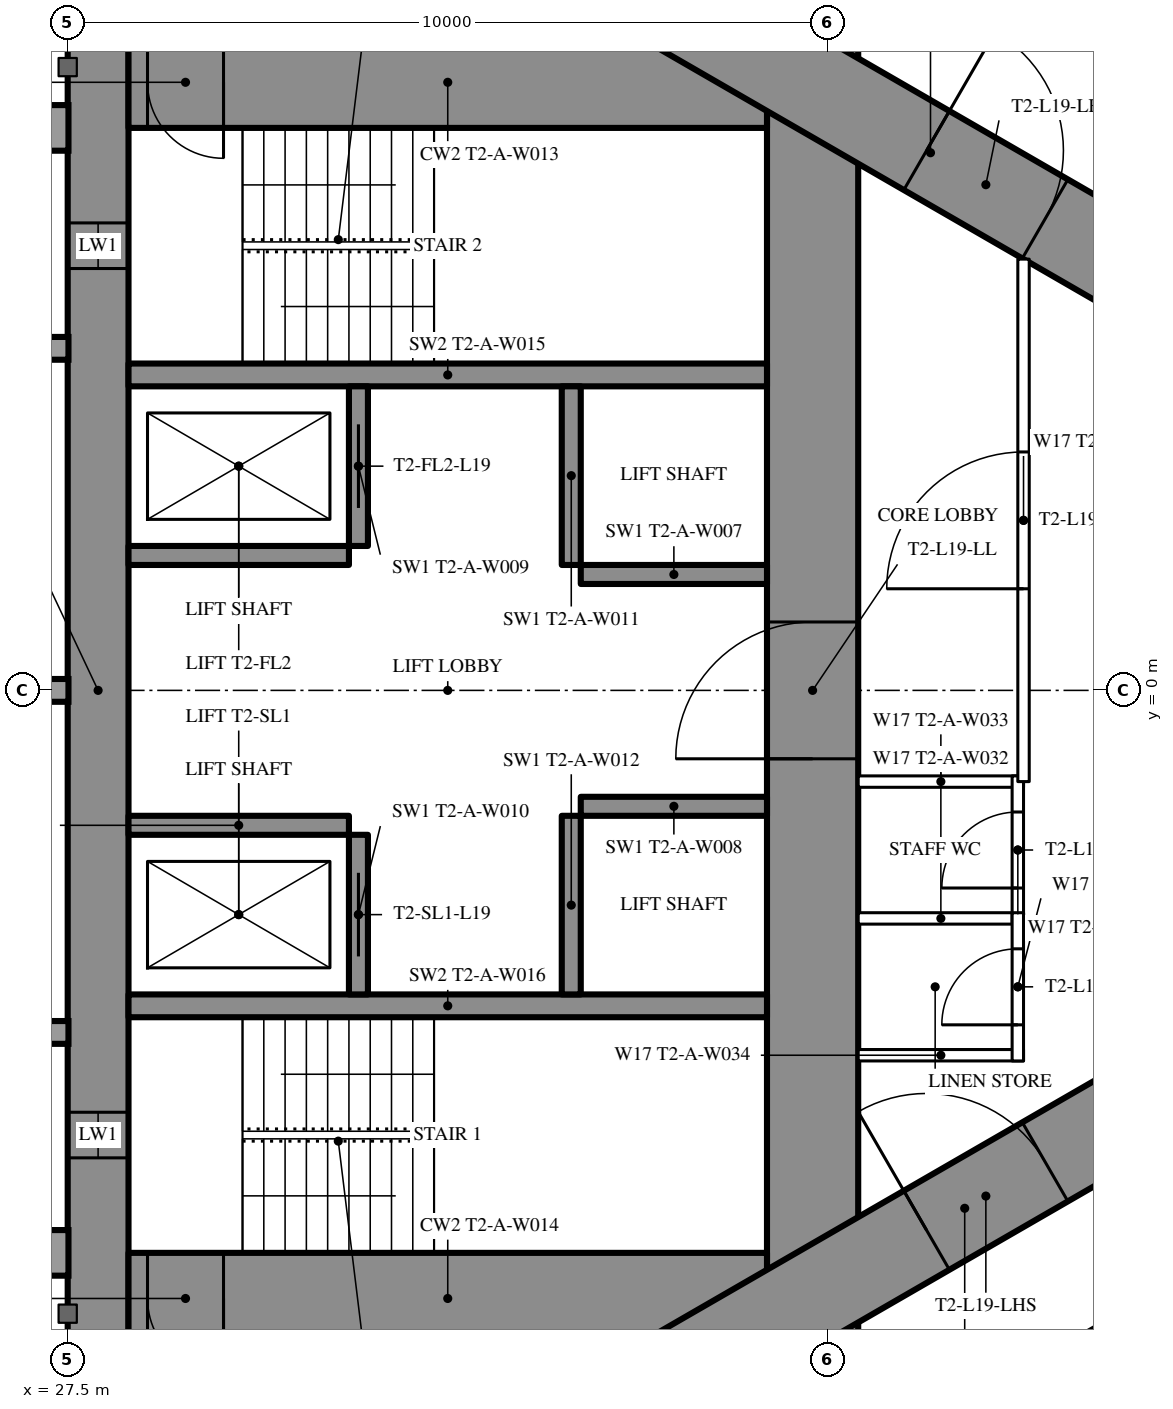
"""IFC4 building model, lengths in metres.
Left out: names, types, materials, properties, quantities, classifications, styles, units other than length and angle.
Written with IfcOpenShell. Run it as: python <this file> out.ifc"""

import sys

from ifc_helpers import new_model, si_unit, direction, frame, frame_2d, origin, place, context, subcontext, project, spatial, rectangle, extrude, element, fill, save


model = new_model("IFC4")
c1 = context("Model", 3, precision=1e-05, world=origin(), true_north=direction((0.0, 1.0)))
c2 = subcontext(c1, "Body", "Model", "MODEL_VIEW")
j1 = project(units=[si_unit("LENGTHUNIT", "METRE"), si_unit("PLANEANGLEUNIT", "RADIAN")], contexts=[c1])
p1 = place(None, origin())
s1 = spatial("IfcSite", under=j1, at=p1, CompositionType="ELEMENT")
p2 = place(p1, origin())
s2 = spatial("IfcBuilding", under=s1, at=p2, CompositionType="ELEMENT")
p3 = place(p2, frame((0.0, 0.0, 74.0)))
s3 = spatial("IfcBuildingStorey", under=s2, at=p3, CompositionType="ELEMENT", Elevation=74.0)
p4 = place(p3, frame((27.9, -8.6, 0.0), z_axis=(0.0, 0.0, 1.0), x_axis=(0.0, 1.0, 0.0)))
e1 = element("IfcWall", 1, at=p4, inside=s3, PredefinedType="SHEAR", context=c2, shape_type="SweptSolid", body=[
    extrude(rectangle(XDim=17.2, YDim=0.8, at=frame_2d((8.6, 0.0))), origin(), (0.0, 0.0, 1.0), 3.5),
])
p5 = place(p4, frame((2.45, 0.0, 0.6)))
e2 = element("IfcOpeningElement", 2, at=p5, cuts=e1, PredefinedType="OPENING", context=c2, shape_type="SweptSolid", body=[
    extrude(rectangle(XDim=0.6, YDim=2.1, at=frame_2d((0.3, 1.05))), frame((0.0, 0.41, 0.0), z_axis=(0.0, -1.0, 0.0), x_axis=(1.0, 0.0, 0.0)), (0.0, 0.0, 1.0), 0.82),
])
p6 = place(p4, frame((14.15, 0.0, 0.6)))
e3 = element("IfcOpeningElement", 3, at=p6, cuts=e1, PredefinedType="OPENING", context=c2, shape_type="SweptSolid", body=[
    extrude(rectangle(XDim=0.6, YDim=2.1, at=frame_2d((0.3, 1.05))), frame((0.0, 0.41, 0.0), z_axis=(0.0, -1.0, 0.0), x_axis=(1.0, 0.0, 0.0)), (0.0, 0.0, 1.0), 0.82),
])
p7 = place(p3, frame((37.3, -8.6, 0.0), z_axis=(0.0, 0.0, 1.0), x_axis=(0.0, 1.0, 0.0)))
e4 = element("IfcWall", 4, at=p7, inside=s3, PredefinedType="SHEAR", context=c2, shape_type="SweptSolid", body=[
    extrude(rectangle(XDim=17.2, YDim=1.2, at=frame_2d((8.6, 0.0))), origin(), (0.0, 0.0, 1.0), 3.5),
])
p8 = place(p7, frame((7.7, 0.0, 0.0)))
e5 = element("IfcOpeningElement", 5, at=p8, cuts=e4, PredefinedType="OPENING", context=c2, shape_type="SweptSolid", body=[
    extrude(rectangle(XDim=1.8, YDim=2.2, at=frame_2d((0.9, 1.1))), frame((0.0, 0.61, 0.0), z_axis=(0.0, -1.0, 0.0), x_axis=(1.0, 0.0, 0.0)), (0.0, 0.0, 1.0), 1.22),
])
p9 = place(p3, frame((28.3, -8.0, 0.0), z_axis=(0.0, 0.0, 1.0), x_axis=(1.0, 0.0, 0.0)))
e6 = element("IfcWall", 6, at=p9, inside=s3, PredefinedType="SHEAR", context=c2, shape_type="SweptSolid", body=[
    extrude(rectangle(XDim=8.4, YDim=1.2, at=frame_2d((4.2, 0.0))), origin(), (0.0, 0.0, 1.0), 3.5),
])
p10 = place(p9, frame((0.25, 0.0, 0.0)))
e7 = element("IfcOpeningElement", 7, at=p10, cuts=e6, PredefinedType="OPENING", context=c2, shape_type="SweptSolid", body=[
    extrude(rectangle(XDim=1.0, YDim=2.2, at=frame_2d((0.5, 1.1))), frame((0.0, 0.61, 0.0), z_axis=(0.0, -1.0, 0.0), x_axis=(1.0, 0.0, 0.0)), (0.0, 0.0, 1.0), 1.22),
])
p11 = place(p3, frame((28.3, 8.0, 0.0), z_axis=(0.0, 0.0, 1.0), x_axis=(1.0, 0.0, 0.0)))
e8 = element("IfcWall", 8, at=p11, inside=s3, PredefinedType="SHEAR", context=c2, shape_type="SweptSolid", body=[
    extrude(rectangle(XDim=8.4, YDim=1.2, at=frame_2d((4.2, 0.0))), origin(), (0.0, 0.0, 1.0), 3.5),
])
p12 = place(p11, frame((0.25, 0.0, 0.0)))
e9 = element("IfcOpeningElement", 9, at=p12, cuts=e8, PredefinedType="OPENING", context=c2, shape_type="SweptSolid", body=[
    extrude(rectangle(XDim=1.0, YDim=2.2, at=frame_2d((0.5, 1.1))), frame((0.0, 0.61, 0.0), z_axis=(0.0, -1.0, 0.0), x_axis=(1.0, 0.0, 0.0)), (0.0, 0.0, 1.0), 1.22),
])
for number, where, z_axis, x_axis in (
    (10, (28.3, -4.15, 0.0), (0.0, 0.0, 1.0), (1.0, 0.0, 0.0)),
    (11, (28.3, 4.15, 0.0), (0.0, 0.0, 1.0), (1.0, 0.0, 0.0)),
):
    element("IfcWall", number, at=place(p3, frame(where, z_axis=z_axis, x_axis=x_axis)), inside=s3, PredefinedType="SHEAR", context=c2, shape_type="SweptSolid", body=[
        extrude(rectangle(XDim=8.4, YDim=0.3, at=frame_2d((4.2, 0.0))), origin(), (0.0, 0.0, 1.0), 3.5),
    ])
p13 = place(p3, frame((31.325, -4.0, 0.0), z_axis=(0.0, 0.0, 1.0), x_axis=(0.0, 1.0, 0.0)))
e12 = element("IfcWall", 12, at=p13, inside=s3, PredefinedType="SHEAR", context=c2, shape_type="SweptSolid", body=[
    extrude(rectangle(XDim=2.1, YDim=0.25, at=frame_2d((1.05, 0.0))), origin(), (0.0, 0.0, 1.0), 3.5),
])
p14 = place(p13, frame((0.5, 0.0, 0.0)))
e13 = element("IfcOpeningElement", 13, at=p14, cuts=e12, PredefinedType="OPENING", context=c2, shape_type="SweptSolid", body=[
    extrude(rectangle(XDim=1.1, YDim=2.2, at=frame_2d((0.55, 1.1))), frame((0.0, 0.135, 0.0), z_axis=(0.0, -1.0, 0.0), x_axis=(1.0, 0.0, 0.0)), (0.0, 0.0, 1.0), 0.27),
])
p15 = place(p3, frame((34.125, -4.0, 0.0), z_axis=(0.0, 0.0, 1.0), x_axis=(0.0, 1.0, 0.0)))
e14 = element("IfcWall", 14, at=p15, inside=s3, PredefinedType="SHEAR", context=c2, shape_type="SweptSolid", body=[
    extrude(rectangle(XDim=2.35, YDim=0.25, at=frame_2d((1.175, 0.0))), origin(), (0.0, 0.0, 1.0), 3.5),
])
p16 = place(p3, frame((28.3, -1.775, 0.0), z_axis=(0.0, 0.0, 1.0), x_axis=(1.0, 0.0, 0.0)))
e15 = element("IfcWall", 15, at=p16, inside=s3, PredefinedType="SHEAR", context=c2, shape_type="SweptSolid", body=[
    extrude(rectangle(XDim=2.9, YDim=0.25, at=frame_2d((1.45, 0.0))), origin(), (0.0, 0.0, 1.0), 3.5),
])
p17 = place(p3, frame((34.25, -1.525, 0.0), z_axis=(0.0, 0.0, 1.0), x_axis=(1.0, 0.0, 0.0)))
e16 = element("IfcWall", 16, at=p17, inside=s3, PredefinedType="SHEAR", context=c2, shape_type="SweptSolid", body=[
    extrude(rectangle(XDim=2.45, YDim=0.25, at=frame_2d((1.225, 0.0))), origin(), (0.0, 0.0, 1.0), 3.5),
])
p18 = place(p3, frame((31.325, 1.9, 0.0), z_axis=(0.0, 0.0, 1.0), x_axis=(0.0, 1.0, 0.0)))
e17 = element("IfcWall", 17, at=p18, inside=s3, PredefinedType="SHEAR", context=c2, shape_type="SweptSolid", body=[
    extrude(rectangle(XDim=2.1, YDim=0.25, at=frame_2d((1.05, 0.0))), origin(), (0.0, 0.0, 1.0), 3.5),
])
p19 = place(p18, frame((0.5, 0.0, 0.0)))
e18 = element("IfcOpeningElement", 18, at=p19, cuts=e17, PredefinedType="OPENING", context=c2, shape_type="SweptSolid", body=[
    extrude(rectangle(XDim=1.1, YDim=2.2, at=frame_2d((0.55, 1.1))), frame((0.0, 0.135, 0.0), z_axis=(0.0, -1.0, 0.0), x_axis=(1.0, 0.0, 0.0)), (0.0, 0.0, 1.0), 0.27),
])
p20 = place(p3, frame((34.125, 1.65, 0.0), z_axis=(0.0, 0.0, 1.0), x_axis=(0.0, 1.0, 0.0)))
e19 = element("IfcWall", 19, at=p20, inside=s3, PredefinedType="SHEAR", context=c2, shape_type="SweptSolid", body=[
    extrude(rectangle(XDim=2.35, YDim=0.25, at=frame_2d((1.175, 0.0))), origin(), (0.0, 0.0, 1.0), 3.5),
])
p21 = place(p3, frame((28.3, 1.775, 0.0), z_axis=(0.0, 0.0, 1.0), x_axis=(1.0, 0.0, 0.0)))
e20 = element("IfcWall", 20, at=p21, inside=s3, PredefinedType="SHEAR", context=c2, shape_type="SweptSolid", body=[
    extrude(rectangle(XDim=2.9, YDim=0.25, at=frame_2d((1.45, 0.0))), origin(), (0.0, 0.0, 1.0), 3.5),
])
p22 = place(p3, frame((34.25, 1.525, 0.0), z_axis=(0.0, 0.0, 1.0), x_axis=(1.0, 0.0, 0.0)))
e21 = element("IfcWall", 21, at=p22, inside=s3, PredefinedType="SHEAR", context=c2, shape_type="SweptSolid", body=[
    extrude(rectangle(XDim=2.45, YDim=0.25, at=frame_2d((1.225, 0.0))), origin(), (0.0, 0.0, 1.0), 3.5),
])
p23 = place(p3, frame((27.2, -13.8, 0.0), z_axis=(0.0, 0.0, 1.0), x_axis=(0.866027159892, 0.499996958321, 0.0)))
e22 = element("IfcWall", 22, at=p23, inside=s3, PredefinedType="SHEAR", context=c2, shape_type="SweptSolid", body=[
    extrude(rectangle(XDim=27.947, YDim=1.2, at=frame_2d((13.973, 0.0))), origin(), (0.0, 0.0, 1.0), 3.5),
])
p24 = place(p23, frame((4.6, 0.0, 0.0)))
e23 = element("IfcOpeningElement", 23, at=p24, cuts=e22, PredefinedType="OPENING", context=c2, shape_type="SweptSolid", body=[
    extrude(rectangle(XDim=1.0, YDim=2.2, at=frame_2d((0.5, 1.1))), frame((0.0, 0.61, 0.0), z_axis=(0.0, -1.0, 0.0), x_axis=(1.0, 0.0, 0.0)), (0.0, 0.0, 1.0), 1.22),
])
p25 = place(p23, frame((13.395, 0.0, 0.0)))
e24 = element("IfcOpeningElement", 24, at=p25, cuts=e22, PredefinedType="OPENING", context=c2, shape_type="SweptSolid", body=[
    extrude(rectangle(XDim=1.8, YDim=2.2, at=frame_2d((0.9, 1.1))), frame((0.0, 0.61, 0.0), z_axis=(0.0, -1.0, 0.0), x_axis=(1.0, 0.0, 0.0)), (0.0, 0.0, 1.0), 1.22),
])
p26 = place(p3, frame((27.2, 13.8, 0.0), z_axis=(0.0, 0.0, 1.0), x_axis=(0.866024515034, -0.500001539357, 0.0)))
e25 = element("IfcWall", 25, at=p26, inside=s3, PredefinedType="SHEAR", context=c2, shape_type="SweptSolid", body=[
    extrude(rectangle(XDim=26.907, YDim=1.2, at=frame_2d((13.454, 0.0))), origin(), (0.0, 0.0, 1.0), 3.5),
])
p27 = place(p26, frame((4.6, 0.0, 0.0)))
e26 = element("IfcOpeningElement", 26, at=p27, cuts=e25, PredefinedType="OPENING", context=c2, shape_type="SweptSolid", body=[
    extrude(rectangle(XDim=1.0, YDim=2.2, at=frame_2d((0.5, 1.1))), frame((0.0, 0.61, 0.0), z_axis=(0.0, -1.0, 0.0), x_axis=(1.0, 0.0, 0.0)), (0.0, 0.0, 1.0), 1.22),
])
p28 = place(p26, frame((13.395, 0.0, 0.0)))
e27 = element("IfcOpeningElement", 27, at=p28, cuts=e25, PredefinedType="OPENING", context=c2, shape_type="SweptSolid", body=[
    extrude(rectangle(XDim=1.8, YDim=2.2, at=frame_2d((0.9, 1.1))), frame((0.0, 0.61, 0.0), z_axis=(0.0, -1.0, 0.0), x_axis=(1.0, 0.0, 0.0)), (0.0, 0.0, 1.0), 1.22),
])
p29 = place(p3, frame((36.834, 10.894, 0.0), z_axis=(0.0, 0.0, 1.0), x_axis=(0.866028157229, -0.499995230863, 0.0)))
e28 = element("IfcWall", 28, at=p29, inside=s3, PredefinedType="PARTITIONING", context=c2, shape_type="SweptSolid", body=[
    extrude(rectangle(XDim=21.667, YDim=0.2, at=frame_2d((10.833, 0.0))), origin(), (0.0, 0.0, 1.0), 3.25),
])
p30 = place(p29, frame((18.885, 0.0, 0.0)))
e29 = element("IfcOpeningElement", 29, at=p30, cuts=e28, PredefinedType="OPENING", context=c2, shape_type="SweptSolid", body=[
    extrude(rectangle(XDim=0.95, YDim=2.2, at=frame_2d((0.475, 1.1))), frame((0.0, 0.11, 0.0), z_axis=(0.0, -1.0, 0.0), x_axis=(1.0, 0.0, 0.0)), (0.0, 0.0, 1.0), 0.22),
])
p31 = place(p29, frame((15.443, 0.0, 0.0)))
e30 = element("IfcOpeningElement", 30, at=p31, cuts=e28, PredefinedType="OPENING", context=c2, shape_type="SweptSolid", body=[
    extrude(rectangle(XDim=1.8, YDim=2.2, at=frame_2d((0.9, 1.1))), frame((0.0, 0.11, 0.0), z_axis=(0.0, -1.0, 0.0), x_axis=(1.0, 0.0, 0.0)), (0.0, 0.0, 1.0), 0.22),
])
p32 = place(p29, frame((12.562, 0.0, 0.0)))
e31 = element("IfcOpeningElement", 31, at=p32, cuts=e28, PredefinedType="OPENING", context=c2, shape_type="SweptSolid", body=[
    extrude(rectangle(XDim=0.95, YDim=2.2, at=frame_2d((0.475, 1.1))), frame((0.0, 0.11, 0.0), z_axis=(0.0, -1.0, 0.0), x_axis=(1.0, 0.0, 0.0)), (0.0, 0.0, 1.0), 0.22),
])
p33 = place(p29, frame((4.292, 0.0, 0.0)))
e32 = element("IfcOpeningElement", 32, at=p33, cuts=e28, PredefinedType="OPENING", context=c2, shape_type="SweptSolid", body=[
    extrude(rectangle(XDim=1.0, YDim=2.2, at=frame_2d((0.5, 1.1))), frame((0.0, 0.11, 0.0), z_axis=(0.0, -1.0, 0.0), x_axis=(1.0, 0.0, 0.0)), (0.0, 0.0, 1.0), 0.22),
])
p34 = place(p3, frame((37.96, -10.243, 0.0), z_axis=(0.0, 0.0, 1.0), x_axis=(0.866030548046, 0.499991089772, 0.0)))
e33 = element("IfcWall", 33, at=p34, inside=s3, PredefinedType="PARTITIONING", context=c2, shape_type="SweptSolid", body=[
    extrude(rectangle(XDim=12.849, YDim=0.2, at=frame_2d((6.425, 0.0))), origin(), (0.0, 0.0, 1.0), 3.25),
])
p35 = place(p34, frame((8.949, 0.0, 0.0)))
e34 = element("IfcOpeningElement", 34, at=p35, cuts=e33, PredefinedType="OPENING", context=c2, shape_type="SweptSolid", body=[
    extrude(rectangle(XDim=0.95, YDim=2.2, at=frame_2d((0.475, 1.1))), frame((0.0, 0.11, 0.0), z_axis=(0.0, -1.0, 0.0), x_axis=(1.0, 0.0, 0.0)), (0.0, 0.0, 1.0), 0.22),
])
p36 = place(p34, frame((0.6, 0.0, 0.0)))
e35 = element("IfcOpeningElement", 35, at=p36, cuts=e33, PredefinedType="OPENING", context=c2, shape_type="SweptSolid", body=[
    extrude(rectangle(XDim=0.95, YDim=2.2, at=frame_2d((0.475, 1.1))), frame((0.0, 0.11, 0.0), z_axis=(0.0, -1.0, 0.0), x_axis=(1.0, 0.0, 0.0)), (0.0, 0.0, 1.0), 0.22),
])
for number, where, z_axis, x_axis in (
    (36, (37.9, -1.2, 0.0), (0.0, 0.0, 1.0), (1.0, 0.0, 0.0)),
    (37, (37.9, -3.0, 0.0), (0.0, 0.0, 1.0), (1.0, 0.0, 0.0)),
    (38, (37.9, -4.8, 0.0), (0.0, 0.0, 1.0), (1.0, 0.0, 0.0)),
):
    element("IfcWall", number, at=place(p3, frame(where, z_axis=z_axis, x_axis=x_axis)), inside=s3, PredefinedType="PARTITIONING", context=c2, shape_type="SweptSolid", body=[
        extrude(rectangle(XDim=2.175, YDim=0.15, at=frame_2d((1.087, 0.0))), origin(), (0.0, 0.0, 1.0), 3.25),
    ])
p37 = place(p3, frame((40.0, -3.075, 0.0), z_axis=(0.0, 0.0, 1.0), x_axis=(0.0, 1.0, 0.0)))
e39 = element("IfcWall", 39, at=p37, inside=s3, PredefinedType="PARTITIONING", context=c2, shape_type="SweptSolid", body=[
    extrude(rectangle(XDim=1.95, YDim=0.15, at=frame_2d((0.975, 0.0))), origin(), (0.0, 0.0, 1.0), 3.25),
])
p38 = place(p37, frame((0.475, 0.0, 0.0)))
e40 = element("IfcOpeningElement", 40, at=p38, cuts=e39, PredefinedType="OPENING", context=c2, shape_type="SweptSolid", body=[
    extrude(rectangle(XDim=1.0, YDim=2.2, at=frame_2d((0.5, 1.1))), frame((0.0, 0.085, 0.0), z_axis=(0.0, -1.0, 0.0), x_axis=(1.0, 0.0, 0.0)), (0.0, 0.0, 1.0), 0.17),
])
p39 = place(p3, frame((40.0, -4.875, 0.0), z_axis=(0.0, 0.0, 1.0), x_axis=(0.0, 1.0, 0.0)))
e41 = element("IfcWall", 41, at=p39, inside=s3, PredefinedType="PARTITIONING", context=c2, shape_type="SweptSolid", body=[
    extrude(rectangle(XDim=1.95, YDim=0.15, at=frame_2d((0.975, 0.0))), origin(), (0.0, 0.0, 1.0), 3.25),
])
p40 = place(p39, frame((0.475, 0.0, 0.0)))
e42 = element("IfcOpeningElement", 42, at=p40, cuts=e41, PredefinedType="OPENING", context=c2, shape_type="SweptSolid", body=[
    extrude(rectangle(XDim=1.0, YDim=2.2, at=frame_2d((0.5, 1.1))), frame((0.0, 0.085, 0.0), z_axis=(0.0, -1.0, 0.0), x_axis=(1.0, 0.0, 0.0)), (0.0, 0.0, 1.0), 0.17),
])
p41 = place(p3, frame((40.075, -1.2, 0.0), z_axis=(0.0, 0.0, 1.0), x_axis=(0.0, 1.0, 0.0)))
e43 = element("IfcWall", 43, at=p41, inside=s3, PredefinedType="PARTITIONING", context=c2, shape_type="SweptSolid", body=[
    extrude(rectangle(XDim=6.874, YDim=0.15, at=frame_2d((3.437, 0.0))), origin(), (0.0, 0.0, 1.0), 3.25),
])
p42 = place(p41, frame((2.537, 0.0, 0.0)))
e44 = element("IfcOpeningElement", 44, at=p42, cuts=e43, PredefinedType="OPENING", context=c2, shape_type="SweptSolid", body=[
    extrude(rectangle(XDim=1.8, YDim=2.2, at=frame_2d((0.9, 1.1))), frame((0.0, 0.085, 0.0), z_axis=(0.0, -1.0, 0.0), x_axis=(1.0, 0.0, 0.0)), (0.0, 0.0, 1.0), 0.17),
])
p43 = place(p33, origin())
e45 = element("IfcDoor", 45, at=p43, inside=s3, OperationType="SINGLE_SWING_LEFT", PredefinedType="DOOR", context=c2, shape_type="SweptSolid", body=[
    extrude(rectangle(XDim=1.0, YDim=2.2, at=frame_2d((0.5, 1.1))), frame((0.0, 0.025, 0.0), z_axis=(0.0, -1.0, 0.0), x_axis=(1.0, 0.0, 0.0)), (0.0, 0.0, 1.0), 0.05),
])
fill(e32, e45)
p44 = place(p38, origin())
e46 = element("IfcDoor", 46, at=p44, inside=s3, OperationType="SINGLE_SWING_LEFT", PredefinedType="DOOR", context=c2, shape_type="SweptSolid", body=[
    extrude(rectangle(XDim=1.0, YDim=2.2, at=frame_2d((0.5, 1.1))), frame((0.0, 0.025, 0.0), z_axis=(0.0, -1.0, 0.0), x_axis=(1.0, 0.0, 0.0)), (0.0, 0.0, 1.0), 0.05),
])
fill(e40, e46)
p45 = place(p40, origin())
e47 = element("IfcDoor", 47, at=p45, inside=s3, OperationType="SINGLE_SWING_LEFT", PredefinedType="DOOR", context=c2, shape_type="SweptSolid", body=[
    extrude(rectangle(XDim=1.0, YDim=2.2, at=frame_2d((0.5, 1.1))), frame((0.0, 0.025, 0.0), z_axis=(0.0, -1.0, 0.0), x_axis=(1.0, 0.0, 0.0)), (0.0, 0.0, 1.0), 0.05),
])
fill(e42, e47)
p46 = place(p42, origin())
e48 = element("IfcDoor", 48, at=p46, inside=s3, OperationType="DOUBLE_DOOR_SINGLE_SWING", PredefinedType="DOOR", context=c2, shape_type="SweptSolid", body=[
    extrude(rectangle(XDim=1.8, YDim=2.2, at=frame_2d((0.9, 1.1))), frame((0.0, 0.025, 0.0), z_axis=(0.0, -1.0, 0.0), x_axis=(1.0, 0.0, 0.0)), (0.0, 0.0, 1.0), 0.05),
])
fill(e44, e48)
p47 = place(p25, origin())
e49 = element("IfcDoor", 49, at=p47, inside=s3, OperationType="DOUBLE_DOOR_SINGLE_SWING", PredefinedType="DOOR", context=c2, shape_type="SweptSolid", body=[
    extrude(rectangle(XDim=1.8, YDim=2.2, at=frame_2d((0.9, 1.1))), frame((0.0, 0.025, 0.0), z_axis=(0.0, -1.0, 0.0), x_axis=(1.0, 0.0, 0.0)), (0.0, 0.0, 1.0), 0.05),
])
fill(e24, e49)
p48 = place(p28, origin())
e50 = element("IfcDoor", 50, at=p48, inside=s3, OperationType="DOUBLE_DOOR_SINGLE_SWING", PredefinedType="DOOR", context=c2, shape_type="SweptSolid", body=[
    extrude(rectangle(XDim=1.8, YDim=2.2, at=frame_2d((0.9, 1.1))), frame((0.0, 0.025, 0.0), z_axis=(0.0, -1.0, 0.0), x_axis=(1.0, 0.0, 0.0)), (0.0, 0.0, 1.0), 0.05),
])
fill(e27, e50)
p49 = place(p8, origin())
e51 = element("IfcDoor", 51, at=p49, inside=s3, OperationType="DOUBLE_DOOR_SINGLE_SWING", PredefinedType="DOOR", context=c2, shape_type="SweptSolid", body=[
    extrude(rectangle(XDim=1.8, YDim=2.2, at=frame_2d((0.9, 1.1))), frame((0.0, 0.025, 0.0), z_axis=(0.0, -1.0, 0.0), x_axis=(1.0, 0.0, 0.0)), (0.0, 0.0, 1.0), 0.05),
])
fill(e5, e51)
p50 = place(p10, origin())
e52 = element("IfcDoor", 52, at=p50, inside=s3, OperationType="SINGLE_SWING_RIGHT", PredefinedType="DOOR", context=c2, shape_type="SweptSolid", body=[
    extrude(rectangle(XDim=1.0, YDim=2.2, at=frame_2d((0.5, 1.1))), frame((0.0, 0.025, 0.0), z_axis=(0.0, -1.0, 0.0), x_axis=(1.0, 0.0, 0.0)), (0.0, 0.0, 1.0), 0.05),
])
fill(e7, e52)
p51 = place(p12, origin())
e53 = element("IfcDoor", 53, at=p51, inside=s3, OperationType="SINGLE_SWING_RIGHT", PredefinedType="DOOR", context=c2, shape_type="SweptSolid", body=[
    extrude(rectangle(XDim=1.0, YDim=2.2, at=frame_2d((0.5, 1.1))), frame((0.0, 0.025, 0.0), z_axis=(0.0, -1.0, 0.0), x_axis=(1.0, 0.0, 0.0)), (0.0, 0.0, 1.0), 0.05),
])
fill(e9, e53)
p52 = place(p14, origin())
e54 = element("IfcDoor", 54, at=p52, inside=s3, OperationType="SLIDING_TO_LEFT", PredefinedType="USERDEFINED", context=c2, shape_type="SweptSolid", body=[
    extrude(rectangle(XDim=1.1, YDim=2.2, at=frame_2d((0.55, 1.1))), frame((0.0, 0.025, 0.0), z_axis=(0.0, -1.0, 0.0), x_axis=(1.0, 0.0, 0.0)), (0.0, 0.0, 1.0), 0.05),
])
fill(e13, e54)
p53 = place(p19, origin())
e55 = element("IfcDoor", 55, at=p53, inside=s3, OperationType="SLIDING_TO_LEFT", PredefinedType="USERDEFINED", context=c2, shape_type="SweptSolid", body=[
    extrude(rectangle(XDim=1.1, YDim=2.2, at=frame_2d((0.55, 1.1))), frame((0.0, 0.025, 0.0), z_axis=(0.0, -1.0, 0.0), x_axis=(1.0, 0.0, 0.0)), (0.0, 0.0, 1.0), 0.05),
])
fill(e18, e55)
p54 = place(p5, origin())
e56 = element("IfcWindow", 56, at=p54, inside=s3, PartitioningType="SINGLE_PANEL", PredefinedType="WINDOW", context=c2, shape_type="SweptSolid", body=[
    extrude(rectangle(XDim=0.6, YDim=2.1, at=frame_2d((0.3, 1.05))), frame((0.0, 0.03, 0.0), z_axis=(0.0, -1.0, 0.0), x_axis=(1.0, 0.0, 0.0)), (0.0, 0.0, 1.0), 0.06),
])
fill(e2, e56)
p55 = place(p6, origin())
e57 = element("IfcWindow", 57, at=p55, inside=s3, PartitioningType="SINGLE_PANEL", PredefinedType="WINDOW", context=c2, shape_type="SweptSolid", body=[
    extrude(rectangle(XDim=0.6, YDim=2.1, at=frame_2d((0.3, 1.05))), frame((0.0, 0.03, 0.0), z_axis=(0.0, -1.0, 0.0), x_axis=(1.0, 0.0, 0.0)), (0.0, 0.0, 1.0), 0.06),
])
fill(e3, e57)
save(model, sys.argv[1])
